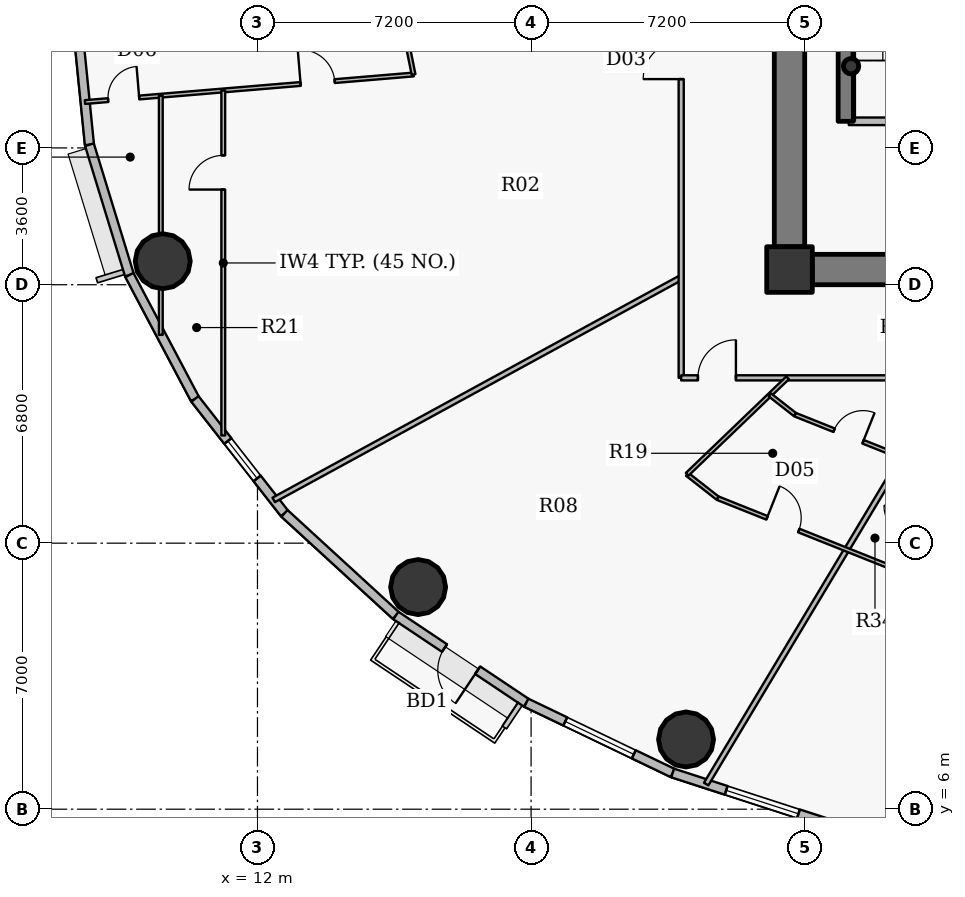
"""IFC4 building model, lengths in metres.
Left out: names, types, materials, properties, quantities, classifications, styles, units other than length and angle.
Written with IfcOpenShell. Run it as: python <this file> out.ifc"""

import sys

from ifc_helpers import new_model, si_unit, direction, frame, frame_2d, origin, origin_2d, place, context, subcontext, project, spatial, rectangle, hollow_circle, extrude, source, transform, mapped, element, fill, save


model = new_model("IFC4")
c1 = context("Model", 3, precision=1e-05, world=origin(), true_north=direction((0.0, 1.0)))
c2 = subcontext(c1, "Body", "Model", "MODEL_VIEW")
j1 = project(units=[si_unit("LENGTHUNIT", "METRE"), si_unit("PLANEANGLEUNIT", "RADIAN")], contexts=[c1])
p1 = place(None, origin())
s1 = spatial("IfcSite", under=j1, at=p1, CompositionType="ELEMENT")
p2 = place(p1, origin())
s2 = spatial("IfcBuilding", under=s1, at=p2, CompositionType="ELEMENT")
p3 = place(p2, frame((0.0, 0.0, 100.95)))
s3 = spatial("IfcBuildingStorey", under=s2, at=p3, CompositionType="ELEMENT", Elevation=100.95)
p4 = place(p3, frame((26.0, 20.2, 0.0), z_axis=(0.0, 0.0, 1.0), x_axis=(1.0, 0.0, 0.0)))
e1 = element("IfcColumn", 1, at=p4, inside=s3, PredefinedType="COLUMN", context=c2, shape_type="SweptSolid", body=[
    extrude(rectangle(XDim=1.2, YDim=1.2, at=origin_2d()), origin(), (0.0, 0.0, 1.0), 3.75),
])
p5 = place(p3, frame((27.48, 24.1, 0.0), z_axis=(0.0, 0.0, 1.0), x_axis=(0.0, 1.0, 0.0)))
e2 = element("IfcWall", 2, at=p5, inside=s3, PredefinedType="SHEAR", context=c2, shape_type="SweptSolid", body=[
    extrude(rectangle(XDim=8.6, YDim=0.4, at=frame_2d((4.3, 0.0))), origin(), (0.0, 0.0, 1.0), 3.75),
])
p6 = place(p3, frame((27.62, 25.55, 0.0), z_axis=(0.0, 0.0, 1.0), x_axis=(1.0, 0.0, 0.0)))
e3 = element("IfcColumn", 3, at=p6, inside=s3, PredefinedType="COLUMN", context=c2, shape_type="SweptSolid", body=[
    extrude(hollow_circle(Radius=0.203, WallThickness=0.016, at=origin_2d()), origin(), (0.0, 0.0, 1.0), 3.75),
])
p7 = place(p3, frame((45.4, 20.2, 0.0), z_axis=(0.0, 0.0, 1.0), x_axis=(-1.0, 0.0, 0.0)))
e4 = element("IfcWall", 4, at=p7, inside=s3, PredefinedType="SHEAR", context=c2, shape_type="SweptSolid", body=[
    extrude(rectangle(XDim=18.8, YDim=0.8, at=frame_2d((9.4, 0.0))), origin(), (0.0, 0.0, 1.0), 2.95),
])
p8 = place(p7, frame((10.15, 0.0, 0.0)))
e5 = element("IfcOpeningElement", 5, at=p8, cuts=e4, PredefinedType="OPENING", context=c2, shape_type="SweptSolid", body=[
    extrude(rectangle(XDim=1.15, YDim=2.15, at=origin_2d()), frame((0.575, 0.41, 1.075), z_axis=(0.0, -1.0, 0.0), x_axis=(1.0, 0.0, 0.0)), (0.0, 0.0, 1.0), 0.82),
])
p9 = place(p3, frame((26.0, 20.8, 0.0), z_axis=(0.0, 0.0, 1.0), x_axis=(0.0, 1.0, 0.0)))
e6 = element("IfcWall", 6, at=p9, inside=s3, PredefinedType="SHEAR", context=c2, shape_type="SweptSolid", body=[
    extrude(rectangle(XDim=12.4, YDim=0.8, at=frame_2d((6.2, 0.0))), origin(), (0.0, 0.0, 1.0), 2.95),
])
p10 = place(p9, frame((5.79, 0.0, 0.0)))
e7 = element("IfcOpeningElement", 7, at=p10, cuts=e6, PredefinedType="OPENING", context=c2, shape_type="SweptSolid", body=[
    extrude(rectangle(XDim=0.82, YDim=2.1, at=origin_2d()), frame((0.41, 0.41, 1.05), z_axis=(0.0, -1.0, 0.0), x_axis=(1.0, 0.0, 0.0)), (0.0, 0.0, 1.0), 0.82),
])
for number, where, z_axis, x_axis in (
    (8, (9.507, 20.419, 0.0), (0.0, 0.0, 1.0), (1.0, 0.0, 0.0)),
    (9, (16.227, 11.844, 0.0), (0.0, 0.0, 1.0), (1.0, 0.0, 0.0)),
    (10, (23.278, 7.835, 0.0), (0.0, 0.0, 1.0), (1.0, 0.0, 0.0)),
):
    element("IfcColumn", number, at=place(p3, frame(where, z_axis=z_axis, x_axis=x_axis)), inside=s3, PredefinedType="COLUMN", context=c2, shape_type="SweptSolid", body=[
        extrude(hollow_circle(Radius=0.725, WallThickness=0.042, at=origin_2d()), origin(), (0.0, 0.0, 1.0), 3.75),
    ])
p11 = place(p3, frame((7.578, 23.485, 0.0), z_axis=(0.0, 0.0, 1.0), x_axis=(-0.099989468229, 0.994988495533, 0.0)))
e11 = element("IfcWall", 11, at=p11, inside=s3, PredefinedType="SOLIDWALL", context=c2, shape_type="SweptSolid", body=[
    extrude(rectangle(XDim=3.533, YDim=0.24, at=frame_2d((1.767, 0.0))), origin(), (0.0, 0.0, 1.0), 3.5),
])
p12 = place(p3, frame((8.63, 20.055, 0.0), z_axis=(0.0, 0.0, 1.0), x_axis=(-0.293124431344, 0.956074300329, 0.0)))
e12 = element("IfcWall", 12, at=p12, inside=s3, PredefinedType="SOLIDWALL", context=c2, shape_type="SweptSolid", body=[
    extrude(rectangle(XDim=3.587, YDim=0.24, at=frame_2d((1.793, 0.0))), origin(), (0.0, 0.0, 1.0), 3.5),
])
p13 = place(p3, frame((10.355, 16.794, 0.0), z_axis=(0.0, 0.0, 1.0), x_axis=(-0.467614004126, 0.883932770716, 0.0)))
e13 = element("IfcWall", 13, at=p13, inside=s3, PredefinedType="SOLIDWALL", context=c2, shape_type="SweptSolid", body=[
    extrude(rectangle(XDim=3.689, YDim=0.24, at=frame_2d((1.844, 0.0))), origin(), (0.0, 0.0, 1.0), 3.5),
])
p14 = place(p3, frame((12.711, 13.783, 0.0), z_axis=(0.0, 0.0, 1.0), x_axis=(-0.616272103517, 0.787533297345, 0.0)))
e14 = element("IfcWall", 14, at=p14, inside=s3, PredefinedType="SOLIDWALL", context=c2, shape_type="SweptSolid", body=[
    extrude(rectangle(XDim=3.823, YDim=0.24, at=frame_2d((1.912, 0.0))), origin(), (0.0, 0.0, 1.0), 3.5),
])
p15 = place(p14, frame((1.168, 0.0, 0.9)))
e15 = element("IfcOpeningElement", 15, at=p15, cuts=e14, PredefinedType="OPENING", context=c2, shape_type="SweptSolid", body=[
    extrude(rectangle(XDim=1.25, YDim=1.65, at=origin_2d()), frame((0.625, 0.13, 0.825), z_axis=(0.0, -1.0, 0.0), x_axis=(1.0, 0.0, 0.0)), (0.0, 0.0, 1.0), 0.26),
])
p16 = place(p3, frame((15.642, 11.097, 0.0), z_axis=(0.0, 0.0, 1.0), x_axis=(-0.737113356241, 0.675769117414, 0.0)))
e16 = element("IfcWall", 16, at=p16, inside=s3, PredefinedType="SOLIDWALL", context=c2, shape_type="SweptSolid", body=[
    extrude(rectangle(XDim=3.976, YDim=0.24, at=frame_2d((1.988, 0.0))), origin(), (0.0, 0.0, 1.0), 3.5),
])
p17 = place(p3, frame((19.075, 8.801, 0.0), z_axis=(0.0, 0.0, 1.0), x_axis=(-0.831221811447, 0.555940914284, 0.0)))
e17 = element("IfcWall", 17, at=p17, inside=s3, PredefinedType="SOLIDWALL", context=c2, shape_type="SweptSolid", body=[
    extrude(rectangle(XDim=4.13, YDim=0.24, at=frame_2d((2.065, 0.0))), origin(), (0.0, 0.0, 1.0), 3.5),
])
p18 = place(p17, frame((1.54, 0.0, 0.0)))
e18 = element("IfcOpeningElement", 18, at=p18, cuts=e17, PredefinedType="OPENING", context=c2, shape_type="SweptSolid", body=[
    extrude(rectangle(XDim=1.05, YDim=2.15, at=origin_2d()), frame((0.525, 0.13, 1.075), z_axis=(0.0, -1.0, 0.0), x_axis=(1.0, 0.0, 0.0)), (0.0, 0.0, 1.0), 0.26),
])
p19 = place(p3, frame((22.926, 6.953, 0.0), z_axis=(0.0, 0.0, 1.0), x_axis=(-0.901589935876, 0.432591709962, 0.0)))
e19 = element("IfcWall", 19, at=p19, inside=s3, PredefinedType="SOLIDWALL", context=c2, shape_type="SweptSolid", body=[
    extrude(rectangle(XDim=4.272, YDim=0.24, at=frame_2d((2.136, 0.0))), origin(), (0.0, 0.0, 1.0), 3.5),
])
p20 = place(p19, frame((1.136, 0.0, 0.9)))
e20 = element("IfcOpeningElement", 20, at=p20, cuts=e19, PredefinedType="OPENING", context=c2, shape_type="SweptSolid", body=[
    extrude(rectangle(XDim=2.0, YDim=1.75, at=origin_2d()), frame((1.0, 0.13, 0.875), z_axis=(0.0, -1.0, 0.0), x_axis=(1.0, 0.0, 0.0)), (0.0, 0.0, 1.0), 0.26),
])
p21 = place(p3, frame((27.1, 5.599, 0.0), z_axis=(0.0, 0.0, 1.0), x_axis=(-0.951211346073, 0.308540070495, 0.0)))
e21 = element("IfcWall", 21, at=p21, inside=s3, PredefinedType="SOLIDWALL", context=c2, shape_type="SweptSolid", body=[
    extrude(rectangle(XDim=4.388, YDim=0.24, at=frame_2d((2.194, 0.0))), origin(), (0.0, 0.0, 1.0), 3.5),
])
p22 = place(p21, frame((0.909, 0.0, 0.9)))
e22 = element("IfcOpeningElement", 22, at=p22, cuts=e21, PredefinedType="OPENING", context=c2, shape_type="SweptSolid", body=[
    extrude(rectangle(XDim=2.0, YDim=1.75, at=origin_2d()), frame((1.0, 0.13, 0.875), z_axis=(0.0, -1.0, 0.0), x_axis=(1.0, 0.0, 0.0)), (0.0, 0.0, 1.0), 0.26),
])
p23 = place(p3, frame((7.461, 24.606, 0.0), z_axis=(0.0, 0.0, 1.0), x_axis=(0.996502351316, 0.083564728334, 0.0)))
e23 = element("IfcWall", 23, at=p23, inside=s3, PredefinedType="PARTITIONING", context=c2, shape_type="SweptSolid", body=[
    extrude(rectangle(XDim=8.677, YDim=0.1, at=frame_2d((4.338, 0.0))), origin(), (0.0, 0.0, 1.0), 2.935),
])
p24 = place(p23, frame((5.695, 0.0, 0.0)))
e24 = element("IfcOpeningElement", 24, at=p24, cuts=e23, PredefinedType="OPENING", context=c2, shape_type="SweptSolid", body=[
    extrude(rectangle(XDim=0.9, YDim=2.1, at=origin_2d()), frame((0.45, 0.06, 1.05), z_axis=(0.0, -1.0, 0.0), x_axis=(1.0, 0.0, 0.0)), (0.0, 0.0, 1.0), 0.12),
])
p25 = place(p23, frame((0.612, 0.0, 0.0)))
e25 = element("IfcOpeningElement", 25, at=p25, cuts=e23, PredefinedType="OPENING", context=c2, shape_type="SweptSolid", body=[
    extrude(rectangle(XDim=0.82, YDim=2.1, at=origin_2d()), frame((0.41, 0.06, 1.05), z_axis=(0.0, -1.0, 0.0), x_axis=(1.0, 0.0, 0.0)), (0.0, 0.0, 1.0), 0.12),
])
p26 = place(p3, frame((9.457, 18.481, 0.0), z_axis=(0.0, 0.0, 1.0), x_axis=(0.0, 1.0, 0.0)))
e26 = element("IfcWall", 26, at=p26, inside=s3, PredefinedType="PARTITIONING", context=c2, shape_type="SweptSolid", body=[
    extrude(rectangle(XDim=6.293, YDim=0.1, at=frame_2d((3.146, 0.0))), origin(), (0.0, 0.0, 1.0), 2.935),
])
p27 = place(p3, frame((11.1, 15.834, 0.0), z_axis=(0.0, 0.0, 1.0), x_axis=(0.0, 1.0, 0.0)))
e27 = element("IfcWall", 27, at=p27, inside=s3, PredefinedType="PARTITIONING", context=c2, shape_type="SweptSolid", body=[
    extrude(rectangle(XDim=9.078, YDim=0.1, at=frame_2d((4.539, 0.0))), origin(), (0.0, 0.0, 1.0), 2.935),
])
p28 = place(p27, frame((6.47, 0.0, 0.0)))
e28 = element("IfcOpeningElement", 28, at=p28, cuts=e27, PredefinedType="OPENING", context=c2, shape_type="SweptSolid", body=[
    extrude(rectangle(XDim=0.9, YDim=2.1, at=origin_2d()), frame((0.45, 0.06, 1.05), z_axis=(0.0, -1.0, 0.0), x_axis=(1.0, 0.0, 0.0)), (0.0, 0.0, 1.0), 0.12),
])
p29 = place(p3, frame((12.427, 14.138, 0.0), z_axis=(0.0, 0.0, 1.0), x_axis=(0.877835987922, 0.47896135367, 0.0)))
e29 = element("IfcWall", 29, at=p29, inside=s3, PredefinedType="PARTITIONING", context=c2, shape_type="SweptSolid", body=[
    extrude(rectangle(XDim=12.215, YDim=0.135, at=frame_2d((6.107, 0.0))), origin(), (0.0, 0.0, 1.0), 2.935),
])
p30 = place(p3, frame((15.77, 27.0, 0.0), z_axis=(0.0, 0.0, 1.0), x_axis=(0.198211883057, -0.980159195955, 0.0)))
e30 = element("IfcWall", 30, at=p30, inside=s3, PredefinedType="PARTITIONING", context=c2, shape_type="SweptSolid", body=[
    extrude(rectangle(XDim=1.702, YDim=0.1, at=frame_2d((0.851, 0.0))), origin(), (0.0, 0.0, 1.0), 2.935),
])
p31 = place(p3, frame((23.15, 17.35, 0.0), z_axis=(0.0, 0.0, 1.0), x_axis=(0.0, 1.0, 0.0)))
e31 = element("IfcWall", 31, at=p31, inside=s3, PredefinedType="PARTITIONING", context=c2, shape_type="SweptSolid", body=[
    extrude(rectangle(XDim=19.3, YDim=0.135, at=frame_2d((9.65, 0.0))), origin(), (0.0, 0.0, 1.0), 2.935),
])
p32 = place(p31, frame((7.86, 0.0, 0.0)))
e32 = element("IfcOpeningElement", 32, at=p32, cuts=e31, PredefinedType="OPENING", context=c2, shape_type="SweptSolid", body=[
    extrude(rectangle(XDim=1.0, YDim=2.15, at=origin_2d()), frame((0.5, 0.078, 1.075), z_axis=(0.0, -1.0, 0.0), x_axis=(1.0, 0.0, 0.0)), (0.0, 0.0, 1.0), 0.155),
])
p33 = place(p3, frame((23.15, 17.35, 0.0), z_axis=(0.0, 0.0, 1.0), x_axis=(1.0, 0.0, 0.0)))
e33 = element("IfcWall", 33, at=p33, inside=s3, PredefinedType="PARTITIONING", context=c2, shape_type="SweptSolid", body=[
    extrude(rectangle(XDim=10.373, YDim=0.135, at=frame_2d((5.187, 0.0))), origin(), (0.0, 0.0, 1.0), 2.935),
])
p34 = place(p33, frame((0.44, 0.0, 0.0)))
e34 = element("IfcOpeningElement", 34, at=p34, cuts=e33, PredefinedType="OPENING", context=c2, shape_type="SweptSolid", body=[
    extrude(rectangle(XDim=1.0, YDim=2.15, at=origin_2d()), frame((0.5, 0.078, 1.075), z_axis=(0.0, -1.0, 0.0), x_axis=(1.0, 0.0, 0.0)), (0.0, 0.0, 1.0), 0.155),
])
p35 = place(p3, frame((23.307, 14.812, 0.0), z_axis=(0.0, 0.0, 1.0), x_axis=(0.787398737985, -0.616444018075, 0.0)))
e35 = element("IfcWall", 35, at=p35, inside=s3, PredefinedType="PARTITIONING", context=c2, shape_type="SweptSolid", body=[
    extrude(rectangle(XDim=1.018, YDim=0.1, at=frame_2d((0.509, 0.0))), origin(), (0.0, 0.0, 1.0), 3.035),
])
p36 = place(p3, frame((23.307, 14.812, 0.0), z_axis=(0.0, 0.0, 1.0), x_axis=(0.721286127108, 0.692637223113, 0.0)))
e36 = element("IfcWall", 36, at=p36, inside=s3, PredefinedType="PARTITIONING", context=c2, shape_type="SweptSolid", body=[
    extrude(rectangle(XDim=3.664, YDim=0.1, at=frame_2d((1.832, 0.0))), origin(), (0.0, 0.0, 1.0), 3.5),
])
p37 = place(p3, frame((23.808, 6.661, 0.0), z_axis=(0.0, 0.0, 1.0), x_axis=(0.51416439954, 0.857691652195, 0.0)))
e37 = element("IfcWall", 37, at=p37, inside=s3, PredefinedType="PARTITIONING", context=c2, shape_type="SweptSolid", body=[
    extrude(rectangle(XDim=12.462, YDim=0.135, at=frame_2d((6.231, 0.0))), origin(), (0.0, 0.0, 1.0), 2.935),
])
p38 = place(p3, frame((24.109, 14.184, 0.0), z_axis=(0.0, 0.0, 1.0), x_axis=(0.9288090756, -0.370558633798, 0.0)))
e38 = element("IfcWall", 38, at=p38, inside=s3, PredefinedType="PARTITIONING", context=c2, shape_type="SweptSolid", body=[
    extrude(rectangle(XDim=6.072, YDim=0.1, at=frame_2d((3.036, 0.0))), origin(), (0.0, 0.0, 1.0), 2.935),
])
p39 = place(p38, frame((1.398, 0.0, 0.0)))
e39 = element("IfcOpeningElement", 39, at=p39, cuts=e38, PredefinedType="OPENING", context=c2, shape_type="SweptSolid", body=[
    extrude(rectangle(XDim=0.9, YDim=2.1, at=origin_2d()), frame((0.45, 0.06, 1.05), z_axis=(0.0, -1.0, 0.0), x_axis=(1.0, 0.0, 0.0)), (0.0, 0.0, 1.0), 0.12),
])
p40 = place(p3, frame((25.483, 16.901, 0.0), z_axis=(0.0, 0.0, 1.0), x_axis=(0.787321722918, -0.616542378609, 0.0)))
e40 = element("IfcWall", 40, at=p40, inside=s3, PredefinedType="PARTITIONING", context=c2, shape_type="SweptSolid", body=[
    extrude(rectangle(XDim=0.844, YDim=0.1, at=frame_2d((0.422, 0.0))), origin(), (0.0, 0.0, 1.0), 3.5),
])
p41 = place(p3, frame((26.147, 16.381, 0.0), z_axis=(0.0, 0.0, 1.0), x_axis=(0.928793125476, -0.370598610451, 0.0)))
e41 = element("IfcWall", 41, at=p41, inside=s3, PredefinedType="PARTITIONING", context=c2, shape_type="SweptSolid", body=[
    extrude(rectangle(XDim=3.03, YDim=0.1, at=frame_2d((1.515, 0.0))), origin(), (0.0, 0.0, 1.0), 2.935),
])
p42 = place(p41, frame((1.105, 0.0, 0.0)))
e42 = element("IfcOpeningElement", 42, at=p42, cuts=e41, PredefinedType="OPENING", context=c2, shape_type="SweptSolid", body=[
    extrude(rectangle(XDim=0.82, YDim=2.1, at=origin_2d()), frame((0.41, 0.06, 1.05), z_axis=(0.0, -1.0, 0.0), x_axis=(1.0, 0.0, 0.0)), (0.0, 0.0, 1.0), 0.12),
])
p43 = place(p3, frame((27.56, 24.1, 0.0), z_axis=(0.0, 0.0, 1.0), x_axis=(1.0, 0.0, 0.0)))
e43 = element("IfcWall", 43, at=p43, inside=s3, PredefinedType="PARTITIONING", context=c2, shape_type="SweptSolid", body=[
    extrude(rectangle(XDim=3.54, YDim=0.2, at=frame_2d((1.77, 0.0))), origin(), (0.0, 0.0, 1.0), 3.5),
])
p44 = place(p43, frame((1.17, 0.0, 0.0)))
e44 = element("IfcOpeningElement", 44, at=p44, cuts=e43, PredefinedType="OPENING", context=c2, shape_type="SweptSolid", body=[
    extrude(rectangle(XDim=1.2, YDim=2.15, at=origin_2d()), frame((0.6, 0.11, 1.075), z_axis=(0.0, -1.0, 0.0), x_axis=(1.0, 0.0, 0.0)), (0.0, 0.0, 1.0), 0.22),
])
p45 = place(p3, frame((25.6, 20.79, 0.0), z_axis=(0.0, 0.0, 1.0), x_axis=(0.0, -1.0, 0.0)))
e45 = element("IfcWall", 45, at=p45, inside=s3, PredefinedType="PARTITIONING", context=c2, shape_type="SweptSolid", body=[
    extrude(rectangle(XDim=0.99, YDim=0.135, at=frame_2d((0.495, 0.0))), origin(), (0.0, 0.0, 1.0), 3.5),
])
p46 = place(p3, frame((25.907, 19.8, 0.0), z_axis=(0.0, 0.0, 1.0), x_axis=(1.0, 0.0, 0.0)))
e46 = element("IfcWall", 46, at=p46, inside=s3, PredefinedType="PARTITIONING", context=c2, shape_type="SweptSolid", body=[
    extrude(rectangle(XDim=0.683, YDim=0.135, at=frame_2d((0.341, 0.0))), origin(), (0.0, 0.0, 1.0), 2.935),
])
m1 = source(origin(), c2, "Body", "SweptSolid", [
    extrude(rectangle(XDim=1.25, YDim=1.65, at=origin_2d()), frame((0.625, 0.03, 0.825), z_axis=(0.0, -1.0, 0.0), x_axis=(1.0, 0.0, 0.0)), (0.0, 0.0, 1.0), 0.06),
])
p47 = place(p15, origin())
e47 = element("IfcWindow", 47, at=p47, inside=s3, PartitioningType="SINGLE_PANEL", PredefinedType="WINDOW", context=c2, shape_type="MappedRepresentation", body=[
    mapped(m1, transform((0.0, 0.0, 0.0), x_axis=(1.0, 0.0, 0.0), y_axis=(0.0, 1.0, 0.0), z_axis=(0.0, 0.0, 1.0), scale=1.0)),
])
fill(e15, e47)
m2 = source(origin(), c2, "Body", "SweptSolid", [
    extrude(rectangle(XDim=1.05, YDim=2.15, at=origin_2d()), frame((0.525, 0.025, 1.075), z_axis=(0.0, -1.0, 0.0), x_axis=(1.0, 0.0, 0.0)), (0.0, 0.0, 1.0), 0.05),
])
p48 = place(p18, origin())
e48 = element("IfcDoor", 48, at=p48, inside=s3, OperationType="SINGLE_SWING_LEFT", PredefinedType="DOOR", context=c2, shape_type="MappedRepresentation", body=[
    mapped(m2, transform((0.0, 0.0, 0.0), x_axis=(1.0, 0.0, 0.0), y_axis=(0.0, 1.0, 0.0), z_axis=(0.0, 0.0, 1.0), scale=1.0)),
])
fill(e18, e48)
m3 = source(origin(), c2, "Body", "SweptSolid", [
    extrude(rectangle(XDim=2.0, YDim=1.75, at=origin_2d()), frame((1.0, 0.03, 0.875), z_axis=(0.0, -1.0, 0.0), x_axis=(1.0, 0.0, 0.0)), (0.0, 0.0, 1.0), 0.06),
])
p49 = place(p20, origin())
e49 = element("IfcWindow", 49, at=p49, inside=s3, PartitioningType="DOUBLE_PANEL_VERTICAL", PredefinedType="WINDOW", context=c2, shape_type="MappedRepresentation", body=[
    mapped(m3, transform((0.0, 0.0, 0.0), x_axis=(1.0, 0.0, 0.0), y_axis=(0.0, 1.0, 0.0), z_axis=(0.0, 0.0, 1.0), scale=1.0)),
])
fill(e20, e49)
p50 = place(p22, origin())
e50 = element("IfcWindow", 50, at=p50, inside=s3, PartitioningType="DOUBLE_PANEL_VERTICAL", PredefinedType="WINDOW", context=c2, shape_type="MappedRepresentation", body=[
    mapped(m3, transform((0.0, 0.0, 0.0), x_axis=(1.0, 0.0, 0.0), y_axis=(0.0, 1.0, 0.0), z_axis=(0.0, 0.0, 1.0), scale=1.0)),
])
fill(e22, e50)
m4 = source(origin(), c2, "Body", "SweptSolid", [
    extrude(rectangle(XDim=1.0, YDim=2.15, at=origin_2d()), frame((0.5, 0.025, 1.075), z_axis=(0.0, -1.0, 0.0), x_axis=(1.0, 0.0, 0.0)), (0.0, 0.0, 1.0), 0.05),
])
p51 = place(p32, origin())
e51 = element("IfcDoor", 51, at=p51, inside=s3, OperationType="SINGLE_SWING_LEFT", PredefinedType="DOOR", context=c2, shape_type="MappedRepresentation", body=[
    mapped(m4, transform((0.0, 0.0, 0.0), x_axis=(1.0, 0.0, 0.0), y_axis=(0.0, 1.0, 0.0), z_axis=(0.0, 0.0, 1.0), scale=1.0)),
])
fill(e32, e51)
m5 = source(origin(), c2, "Body", "SweptSolid", [
    extrude(rectangle(XDim=0.9, YDim=2.1, at=origin_2d()), frame((0.45, 0.025, 1.05), z_axis=(0.0, -1.0, 0.0), x_axis=(1.0, 0.0, 0.0)), (0.0, 0.0, 1.0), 0.05),
])
p52 = place(p24, origin())
e52 = element("IfcDoor", 52, at=p52, inside=s3, OperationType="SINGLE_SWING_LEFT", PredefinedType="DOOR", context=c2, shape_type="MappedRepresentation", body=[
    mapped(m5, transform((0.0, 0.0, 0.0), x_axis=(1.0, 0.0, 0.0), y_axis=(0.0, 1.0, 0.0), z_axis=(0.0, 0.0, 1.0), scale=1.0)),
])
fill(e24, e52)
m6 = source(origin(), c2, "Body", "SweptSolid", [
    extrude(rectangle(XDim=0.82, YDim=2.1, at=origin_2d()), frame((0.41, 0.025, 1.05), z_axis=(0.0, -1.0, 0.0), x_axis=(1.0, 0.0, 0.0)), (0.0, 0.0, 1.0), 0.05),
])
p53 = place(p25, origin())
e53 = element("IfcDoor", 53, at=p53, inside=s3, OperationType="SINGLE_SWING_RIGHT", PredefinedType="DOOR", context=c2, shape_type="MappedRepresentation", body=[
    mapped(m6, transform((0.0, 0.0, 0.0), x_axis=(1.0, 0.0, 0.0), y_axis=(0.0, 1.0, 0.0), z_axis=(0.0, 0.0, 1.0), scale=1.0)),
])
fill(e25, e53)
p54 = place(p28, origin())
e54 = element("IfcDoor", 54, at=p54, inside=s3, OperationType="SINGLE_SWING_LEFT", PredefinedType="DOOR", context=c2, shape_type="MappedRepresentation", body=[
    mapped(m5, transform((0.0, 0.0, 0.0), x_axis=(1.0, 0.0, 0.0), y_axis=(0.0, 1.0, 0.0), z_axis=(0.0, 0.0, 1.0), scale=1.0)),
])
fill(e28, e54)
p55 = place(p34, origin())
e55 = element("IfcDoor", 55, at=p55, inside=s3, OperationType="SINGLE_SWING_RIGHT", PredefinedType="DOOR", context=c2, shape_type="MappedRepresentation", body=[
    mapped(m4, transform((0.0, 0.0, 0.0), x_axis=(1.0, 0.0, 0.0), y_axis=(0.0, 1.0, 0.0), z_axis=(0.0, 0.0, 1.0), scale=1.0)),
])
fill(e34, e55)
p56 = place(p39, origin())
e56 = element("IfcDoor", 56, at=p56, inside=s3, OperationType="SINGLE_SWING_LEFT", PredefinedType="DOOR", context=c2, shape_type="MappedRepresentation", body=[
    mapped(m5, transform((0.0, 0.0, 0.0), x_axis=(1.0, 0.0, 0.0), y_axis=(0.0, 1.0, 0.0), z_axis=(0.0, 0.0, 1.0), scale=1.0)),
])
fill(e39, e56)
p57 = place(p42, origin())
e57 = element("IfcDoor", 57, at=p57, inside=s3, OperationType="SINGLE_SWING_RIGHT", PredefinedType="DOOR", context=c2, shape_type="MappedRepresentation", body=[
    mapped(m6, transform((0.0, 0.0, 0.0), x_axis=(1.0, 0.0, 0.0), y_axis=(0.0, 1.0, 0.0), z_axis=(0.0, 0.0, 1.0), scale=1.0)),
])
fill(e42, e57)
save(model, sys.argv[1])
